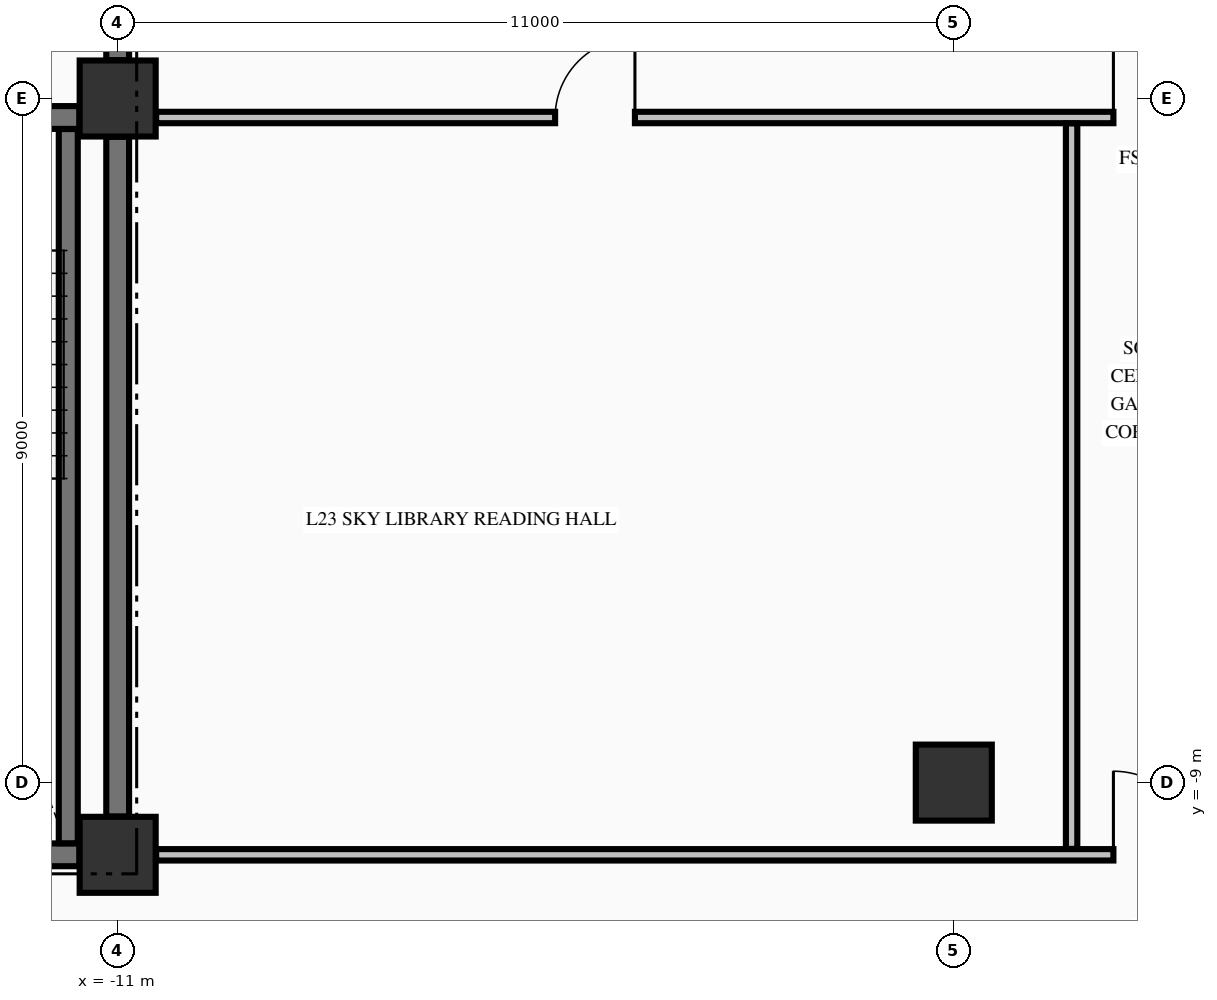
"""IFC4 building model, lengths in metres.
Left out: names, types, materials, properties, quantities, classifications, styles, units other than length and angle.
Written with IfcOpenShell. Run it as: python <this file> out.ifc"""

import sys

from ifc_helpers import new_model, si_unit, direction, frame, frame_2d, origin, origin_2d, place, context, subcontext, project, spatial, rectangle, extrude, element, fill, save


model = new_model("IFC4")
c1 = context("Model", 3, precision=1e-05, world=origin(), true_north=direction((0.0, 1.0)))
c2 = subcontext(c1, "Body", "Model", "MODEL_VIEW")
j1 = project(units=[si_unit("LENGTHUNIT", "METRE"), si_unit("PLANEANGLEUNIT", "RADIAN")], contexts=[c1])
p1 = place(None, origin())
s1 = spatial("IfcSite", under=j1, at=p1, CompositionType="ELEMENT")
p2 = place(p1, origin())
s2 = spatial("IfcBuilding", under=s1, at=p2, CompositionType="ELEMENT")
p3 = place(p2, frame((0.0, 0.0, 94.93)))
s3 = spatial("IfcBuildingStorey", under=s2, at=p3, CompositionType="ELEMENT", Elevation=94.93)
for number, where, z_axis, x_axis in (
    (1, (-11.0, -9.95, -0.25), (0.0, 0.0, 1.0), (1.0, 0.0, 0.0)),
    (2, (-11.0, 0.0, -0.25), (0.0, 0.0, 1.0), (1.0, 0.0, 0.0)),
    (3, (0.0, -9.0, -0.25), (0.0, 0.0, 1.0), (1.0, 0.0, 0.0)),
):
    element("IfcColumn", number, at=place(p3, frame(where, z_axis=z_axis, x_axis=x_axis)), inside=s3, PredefinedType="COLUMN", context=c2, shape_type="SweptSolid", body=[
        extrude(rectangle(XDim=1.0, YDim=1.0, at=origin_2d()), origin(), (0.0, 0.0, 1.0), 3.545),
    ])
p4 = place(p3, frame((-14.7, -9.95, 0.0), z_axis=(0.0, 0.0, 1.0), x_axis=(1.0, 0.0, 0.0)))
e4 = element("IfcWall", 4, at=p4, inside=s3, PredefinedType="SHEAR", context=c2, shape_type="SweptSolid", body=[
    extrude(rectangle(XDim=3.196, YDim=0.3, at=frame_2d((1.598, 0.0))), origin(), (0.0, 0.0, 1.0), 3.295),
])
p5 = place(p3, frame((-19.496, -0.25, 0.0), z_axis=(0.0, 0.0, 1.0), x_axis=(1.0, 0.0, 0.0)))
e5 = element("IfcWall", 5, at=p5, inside=s3, PredefinedType="SHEAR", context=c2, shape_type="SweptSolid", body=[
    extrude(rectangle(XDim=7.992, YDim=0.3, at=frame_2d((3.996, 0.0))), origin(), (0.0, 0.0, 1.0), 3.295),
])
p6 = place(p5, frame((5.796, 0.0, 0.0)))
e6 = element("IfcOpeningElement", 6, at=p6, cuts=e5, PredefinedType="OPENING", context=c2, shape_type="SweptSolid", body=[
    extrude(rectangle(XDim=1.1, YDim=2.15, at=frame_2d((0.55, 1.075))), frame((0.0, 0.16, 0.0), z_axis=(0.0, -1.0, 0.0), x_axis=(1.0, 0.0, 0.0)), (0.0, 0.0, 1.0), 0.32),
])
p7 = place(p3, frame((-10.494, -9.95, 0.0), z_axis=(0.0, 0.0, 1.0), x_axis=(1.0, 0.0, 0.0)))
e7 = element("IfcWall", 7, at=p7, inside=s3, PredefinedType="PARTITIONING", context=c2, shape_type="SweptSolid", body=[
    extrude(rectangle(XDim=20.988, YDim=0.15, at=frame_2d((10.494, 0.0))), origin(), (0.0, 0.0, 1.0), 3.295),
])
p8 = place(p7, frame((12.594, 0.0, 0.0)))
e8 = element("IfcOpeningElement", 8, at=p8, cuts=e7, PredefinedType="OPENING", context=c2, shape_type="SweptSolid", body=[
    extrude(rectangle(XDim=1.1, YDim=2.15, at=frame_2d((0.55, 1.075))), frame((0.0, 0.085, 0.0), z_axis=(0.0, -1.0, 0.0), x_axis=(1.0, 0.0, 0.0)), (0.0, 0.0, 1.0), 0.17),
])
p9 = place(p7, frame((18.799, 0.0, 0.0)))
e9 = element("IfcOpeningElement", 9, at=p9, cuts=e7, PredefinedType="OPENING", context=c2, shape_type="SweptSolid", body=[
    extrude(rectangle(XDim=0.95, YDim=2.15, at=frame_2d((0.475, 1.075))), frame((0.0, 0.085, 0.0), z_axis=(0.0, -1.0, 0.0), x_axis=(1.0, 0.0, 0.0)), (0.0, 0.0, 1.0), 0.17),
])
p10 = place(p3, frame((-10.494, -0.25, 0.0), z_axis=(0.0, 0.0, 1.0), x_axis=(1.0, 0.0, 0.0)))
e10 = element("IfcWall", 10, at=p10, inside=s3, PredefinedType="PARTITIONING", context=c2, shape_type="SweptSolid", body=[
    extrude(rectangle(XDim=20.988, YDim=0.15, at=frame_2d((10.494, 0.0))), origin(), (0.0, 0.0, 1.0), 3.295),
])
p11 = place(p10, frame((12.594, 0.0, 0.0)))
e11 = element("IfcOpeningElement", 11, at=p11, cuts=e10, PredefinedType="OPENING", context=c2, shape_type="SweptSolid", body=[
    extrude(rectangle(XDim=1.1, YDim=2.15, at=frame_2d((0.55, 1.075))), frame((0.0, 0.085, 0.0), z_axis=(0.0, -1.0, 0.0), x_axis=(1.0, 0.0, 0.0)), (0.0, 0.0, 1.0), 0.17),
])
p12 = place(p10, frame((5.249, 0.0, 0.0)))
e12 = element("IfcOpeningElement", 12, at=p12, cuts=e10, PredefinedType="OPENING", context=c2, shape_type="SweptSolid", body=[
    extrude(rectangle(XDim=1.05, YDim=2.15, at=frame_2d((0.525, 1.075))), frame((0.0, 0.085, 0.0), z_axis=(0.0, -1.0, 0.0), x_axis=(1.0, 0.0, 0.0)), (0.0, 0.0, 1.0), 0.17),
])
p13 = place(p10, frame((17.399, 0.0, 0.0)))
e13 = element("IfcOpeningElement", 13, at=p13, cuts=e10, PredefinedType="OPENING", context=c2, shape_type="SweptSolid", body=[
    extrude(rectangle(XDim=0.95, YDim=2.15, at=frame_2d((0.475, 1.075))), frame((0.0, 0.085, 0.0), z_axis=(0.0, -1.0, 0.0), x_axis=(1.0, 0.0, 0.0)), (0.0, 0.0, 1.0), 0.17),
])
p14 = place(p3, frame((-11.65, -9.798, 0.0), z_axis=(0.0, 0.0, 1.0), x_axis=(0.0, 1.0, 0.0)))
e14 = element("IfcWall", 14, at=p14, inside=s3, PredefinedType="SOLIDWALL", context=c2, shape_type="SweptSolid", body=[
    extrude(rectangle(XDim=9.396, YDim=0.25, at=frame_2d((4.698, 0.0))), origin(), (0.0, 0.0, 1.0), 3.295),
])
p15 = place(p3, frame((-11.0, -9.446, 0.0), z_axis=(0.0, 0.0, 1.0), x_axis=(0.0, 1.0, 0.0)))
e15 = element("IfcWall", 15, at=p15, inside=s3, PredefinedType="SHEAR", context=c2, shape_type="SweptSolid", body=[
    extrude(rectangle(XDim=8.942, YDim=0.3, at=frame_2d((4.471, 0.0))), origin(), (0.0, 0.0, 1.0), 3.295),
])
p16 = place(p3, frame((-11.0, 0.504, 0.0), z_axis=(0.0, 0.0, 1.0), x_axis=(0.0, 1.0, 0.0)))
e16 = element("IfcWall", 16, at=p16, inside=s3, PredefinedType="SHEAR", context=c2, shape_type="SweptSolid", body=[
    extrude(rectangle(XDim=2.244, YDim=0.3, at=frame_2d((1.122, 0.0))), origin(), (0.0, 0.0, 1.0), 3.295),
])
p17 = place(p16, frame((0.596, 0.0, 0.0)))
e17 = element("IfcOpeningElement", 17, at=p17, cuts=e16, PredefinedType="OPENING", context=c2, shape_type="SweptSolid", body=[
    extrude(rectangle(XDim=1.1, YDim=2.15, at=frame_2d((0.55, 1.075))), frame((0.0, 0.16, 0.0), z_axis=(0.0, -1.0, 0.0), x_axis=(1.0, 0.0, 0.0)), (0.0, 0.0, 1.0), 0.32),
])
p18 = place(p3, frame((1.55, -9.872, 0.0), z_axis=(0.0, 0.0, 1.0), x_axis=(0.0, 1.0, 0.0)))
e18 = element("IfcWall", 18, at=p18, inside=s3, PredefinedType="PARTITIONING", context=c2, shape_type="SweptSolid", body=[
    extrude(rectangle(XDim=9.544, YDim=0.15, at=frame_2d((4.772, 0.0))), origin(), (0.0, 0.0, 1.0), 3.295),
])
p19 = place(p8, origin())
e19 = element("IfcDoor", 19, at=p19, inside=s3, OperationType="SINGLE_SWING_LEFT", PredefinedType="DOOR", context=c2, shape_type="SweptSolid", body=[
    extrude(rectangle(XDim=1.1, YDim=2.15, at=frame_2d((0.55, 1.075))), frame((0.0, 0.025, 0.0), z_axis=(0.0, -1.0, 0.0), x_axis=(1.0, 0.0, 0.0)), (0.0, 0.0, 1.0), 0.05),
])
fill(e8, e19)
p20 = place(p11, origin())
e20 = element("IfcDoor", 20, at=p20, inside=s3, OperationType="SINGLE_SWING_LEFT", PredefinedType="DOOR", context=c2, shape_type="SweptSolid", body=[
    extrude(rectangle(XDim=1.1, YDim=2.15, at=frame_2d((0.55, 1.075))), frame((0.0, 0.025, 0.0), z_axis=(0.0, -1.0, 0.0), x_axis=(1.0, 0.0, 0.0)), (0.0, 0.0, 1.0), 0.05),
])
fill(e11, e20)
p21 = place(p12, origin())
e21 = element("IfcDoor", 21, at=p21, inside=s3, OperationType="SINGLE_SWING_RIGHT", PredefinedType="DOOR", context=c2, shape_type="SweptSolid", body=[
    extrude(rectangle(XDim=1.05, YDim=2.15, at=frame_2d((0.525, 1.075))), frame((0.0, 0.025, 0.0), z_axis=(0.0, -1.0, 0.0), x_axis=(1.0, 0.0, 0.0)), (0.0, 0.0, 1.0), 0.05),
])
fill(e12, e21)
save(model, sys.argv[1])
